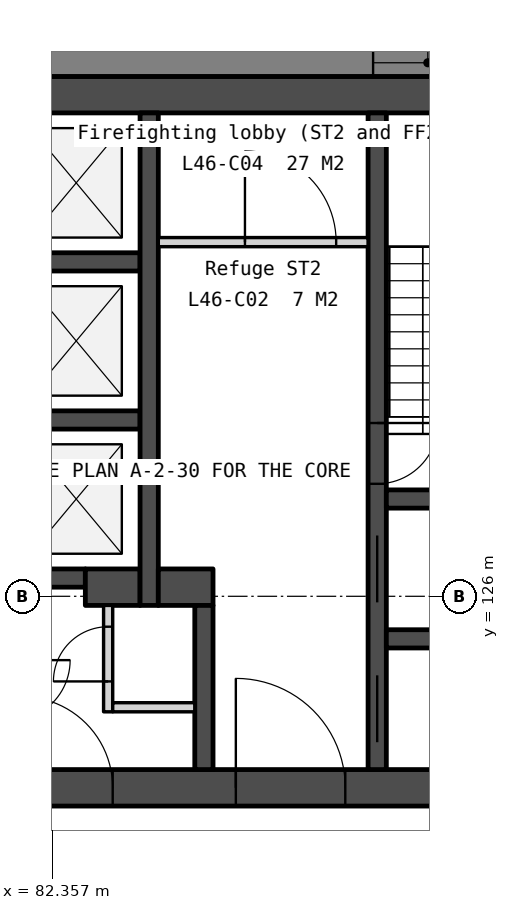
"""IFC4 building model, lengths in metres.
Left out: names, types, materials, properties, quantities, classifications, styles, units other than length and angle.
Written with IfcOpenShell. Run it as: python <this file> out.ifc"""

import sys

from ifc_helpers import new_model, si_unit, direction, frame, frame_2d, origin, place, context, subcontext, project, spatial, polyline, rectangle, outline, extrude, element, fill, save


model = new_model("IFC4")
c1 = context("Model", 3, precision=1e-05, world=origin(), true_north=direction((0.0, 1.0)))
c2 = subcontext(c1, "Body", "Model", "MODEL_VIEW")
j1 = project(units=[si_unit("LENGTHUNIT", "METRE"), si_unit("PLANEANGLEUNIT", "RADIAN")], contexts=[c1])
p1 = place(None, origin())
s1 = spatial("IfcSite", under=j1, at=p1, CompositionType="ELEMENT")
p2 = place(p1, origin())
s2 = spatial("IfcBuilding", under=s1, at=p2, CompositionType="ELEMENT")
p3 = place(p2, frame((0.0, 0.0, 184.1)))
s3 = spatial("IfcBuildingStorey", under=s2, at=p3, CompositionType="ELEMENT", Elevation=184.1)
p4 = place(p3, frame((69.0, 134.25, 0.0), z_axis=(0.0, 0.0, 1.0), x_axis=(1.0, 0.0, 0.0)))
e1 = element("IfcWall", 1, at=p4, inside=s3, PredefinedType="SOLIDWALL", context=c2, shape_type="SweptSolid", body=[
    extrude(rectangle(XDim=22.0, YDim=0.6, at=frame_2d((11.0, 0.0))), origin(), (0.0, 0.0, 1.0), 3.75),
])
p5 = place(p3, frame((69.0, 122.85, 0.0), z_axis=(0.0, 0.0, 1.0), x_axis=(1.0, 0.0, 0.0)))
e2 = element("IfcWall", 2, at=p5, inside=s3, PredefinedType="SOLIDWALL", context=c2, shape_type="SweptSolid", body=[
    extrude(rectangle(XDim=22.0, YDim=0.6, at=frame_2d((11.0, 0.0))), origin(), (0.0, 0.0, 1.0), 3.75),
])
p6 = place(p5, frame((16.375, 0.0, 0.0)))
e3 = element("IfcOpeningElement", 3, at=p6, cuts=e2, PredefinedType="OPENING", context=c2, shape_type="SweptSolid", body=[
    extrude(rectangle(XDim=1.8, YDim=2.1, at=frame_2d((0.9, 1.05))), frame((0.0, 0.31, 0.0), z_axis=(0.0, -1.0, 0.0), x_axis=(1.0, 0.0, 0.0)), (0.0, 0.0, 1.0), 0.62),
])
p7 = place(p5, frame((3.825, 0.0, 0.0)))
e4 = element("IfcOpeningElement", 4, at=p7, cuts=e2, PredefinedType="OPENING", context=c2, shape_type="SweptSolid", body=[
    extrude(rectangle(XDim=1.8, YDim=2.1, at=frame_2d((0.9, 1.05))), frame((0.0, 0.31, 0.0), z_axis=(0.0, -1.0, 0.0), x_axis=(1.0, 0.0, 0.0)), (0.0, 0.0, 1.0), 0.62),
])
p8 = place(p5, frame((12.85, 0.0, 0.0)))
e5 = element("IfcOpeningElement", 5, at=p8, cuts=e2, PredefinedType="OPENING", context=c2, shape_type="SweptSolid", body=[
    extrude(rectangle(XDim=1.5, YDim=2.1, at=frame_2d((0.75, 1.05))), frame((0.0, 0.31, 0.0), z_axis=(0.0, -1.0, 0.0), x_axis=(1.0, 0.0, 0.0)), (0.0, 0.0, 1.0), 0.62),
])
for number, where, z_axis, x_axis in (
    (6, (81.7, 131.5, 0.0), (0.0, 0.0, 1.0), (1.0, 0.0, 0.0)),
    (7, (81.7, 128.9, 0.0), (0.0, 0.0, 1.0), (1.0, 0.0, 0.0)),
):
    element("IfcWall", number, at=place(p3, frame(where, z_axis=z_axis, x_axis=x_axis)), inside=s3, PredefinedType="SOLIDWALL", context=c2, shape_type="SweptSolid", body=[
        extrude(rectangle(XDim=2.1, YDim=0.3, at=frame_2d((1.05, 0.0))), origin(), (0.0, 0.0, 1.0), 3.75),
    ])
p9 = place(p3, frame((81.7, 126.3, 0.0), z_axis=(0.0, 0.0, 1.0), x_axis=(1.0, 0.0, 0.0)))
e8 = element("IfcWall", 8, at=p9, inside=s3, PredefinedType="SOLIDWALL", context=c2, shape_type="SweptSolid", body=[
    extrude(rectangle(XDim=1.2, YDim=0.3, at=frame_2d((0.6, 0.0))), origin(), (0.0, 0.0, 1.0), 3.75),
])
p10 = place(p3, frame((82.9, 126.15, 0.0), z_axis=(0.0, 0.0, 1.0), x_axis=(1.0, 0.0, 0.0)))
e9 = element("IfcWall", 9, at=p10, inside=s3, PredefinedType="SOLIDWALL", context=c2, shape_type="SweptSolid", body=[
    extrude(rectangle(XDim=0.9, YDim=0.6, at=frame_2d((0.45, 0.0))), origin(), (0.0, 0.0, 1.0), 3.75),
])
p11 = place(p3, frame((83.275, 125.85, 0.0), z_axis=(0.0, 0.0, 1.0), x_axis=(0.0, -1.0, 0.0)))
e10 = element("IfcWall", 10, at=p11, inside=s3, PredefinedType="PARTITIONING", context=c2, shape_type="SweptSolid", body=[
    extrude(rectangle(XDim=1.75, YDim=0.15, at=frame_2d((0.875, 0.0))), origin(), (0.0, 0.0, 1.0), 3.75),
])
p12 = place(p11, frame((0.35, 0.0, 0.0)))
e11 = element("IfcOpeningElement", 11, at=p12, cuts=e10, PredefinedType="OPENING", context=c2, shape_type="SweptSolid", body=[
    extrude(rectangle(XDim=0.9, YDim=2.1, at=frame_2d((0.45, 1.05))), frame((0.0, 0.085, 0.0), z_axis=(0.0, -1.0, 0.0), x_axis=(1.0, 0.0, 0.0)), (0.0, 0.0, 1.0), 0.17),
])
p13 = place(p3, frame((83.35, 124.175, 0.0), z_axis=(0.0, 0.0, 1.0), x_axis=(1.0, 0.0, 0.0)))
e12 = element("IfcWall", 12, at=p13, inside=s3, PredefinedType="PARTITIONING", context=c2, shape_type="SweptSolid", body=[
    extrude(rectangle(XDim=1.35, YDim=0.15, at=frame_2d((0.675, 0.0))), origin(), (0.0, 0.0, 1.0), 3.75),
])
p14 = place(p3, frame((83.95, 133.95, 0.0), z_axis=(0.0, 0.0, 1.0), x_axis=(0.0, -1.0, 0.0)))
e13 = element("IfcWall", 13, at=p14, inside=s3, PredefinedType="SOLIDWALL", context=c2, shape_type="SweptSolid", body=[
    extrude(rectangle(XDim=8.1, YDim=0.3, at=frame_2d((4.05, 0.0))), origin(), (0.0, 0.0, 1.0), 3.75),
])
p15 = place(p3, frame((84.1, 131.825, 0.0), z_axis=(0.0, 0.0, 1.0), x_axis=(1.0, 0.0, 0.0)))
e14 = element("IfcWall", 14, at=p15, inside=s3, PredefinedType="PARTITIONING", context=c2, shape_type="SweptSolid", body=[
    extrude(rectangle(XDim=3.45, YDim=0.15, at=frame_2d((1.725, 0.0))), origin(), (0.0, 0.0, 1.0), 3.75),
])
p16 = place(p15, frame((1.425, 0.0, 0.0)))
e15 = element("IfcOpeningElement", 15, at=p16, cuts=e14, PredefinedType="OPENING", context=c2, shape_type="SweptSolid", body=[
    extrude(rectangle(XDim=1.5, YDim=2.1, at=frame_2d((0.75, 1.05))), frame((0.0, 0.085, 0.0), z_axis=(0.0, -1.0, 0.0), x_axis=(1.0, 0.0, 0.0)), (0.0, 0.0, 1.0), 0.17),
])
p17 = place(p3, frame((84.1, 126.15, 0.0), z_axis=(0.0, 0.0, 1.0), x_axis=(1.0, 0.0, 0.0)))
e16 = element("IfcWall", 16, at=p17, inside=s3, PredefinedType="SOLIDWALL", context=c2, shape_type="SweptSolid", body=[
    extrude(rectangle(XDim=0.9, YDim=0.6, at=frame_2d((0.45, 0.0))), origin(), (0.0, 0.0, 1.0), 3.75),
])
p18 = place(p3, frame((84.85, 125.85, 0.0), z_axis=(0.0, 0.0, 1.0), x_axis=(0.0, -1.0, 0.0)))
e17 = element("IfcWall", 17, at=p18, inside=s3, PredefinedType="SOLIDWALL", context=c2, shape_type="SweptSolid", body=[
    extrude(rectangle(XDim=2.7, YDim=0.3, at=frame_2d((1.35, 0.0))), origin(), (0.0, 0.0, 1.0), 3.75),
])
p19 = place(p3, frame((87.7, 133.95, 0.0), z_axis=(0.0, 0.0, 1.0), x_axis=(0.0, -1.0, 0.0)))
e18 = element("IfcWall", 18, at=p19, inside=s3, PredefinedType="SOLIDWALL", context=c2, shape_type="SweptSolid", body=[
    extrude(rectangle(XDim=10.8, YDim=0.3, at=frame_2d((5.4, 0.0))), origin(), (0.0, 0.0, 1.0), 3.75),
])
p20 = place(p19, frame((6.95, 0.0, 0.0)))
e19 = element("IfcOpeningElement", 19, at=p20, cuts=e18, PredefinedType="OPENING", context=c2, shape_type="SweptSolid", body=[
    extrude(rectangle(XDim=1.1, YDim=2.1, at=frame_2d((0.55, 1.05))), frame((0.0, 0.16, 0.0), z_axis=(0.0, -1.0, 0.0), x_axis=(1.0, 0.0, 0.0)), (0.0, 0.0, 1.0), 0.32),
])
p21 = place(p19, frame((5.1, 0.0, 0.0)))
e20 = element("IfcOpeningElement", 20, at=p21, cuts=e18, PredefinedType="OPENING", context=c2, shape_type="SweptSolid", body=[
    extrude(rectangle(XDim=1.0, YDim=2.1, at=frame_2d((0.5, 1.05))), frame((0.0, 0.16, 0.0), z_axis=(0.0, -1.0, 0.0), x_axis=(1.0, 0.0, 0.0)), (0.0, 0.0, 1.0), 0.32),
])
p22 = place(p19, frame((9.25, 0.0, 0.0)))
e21 = element("IfcOpeningElement", 21, at=p22, cuts=e18, PredefinedType="OPENING", context=c2, shape_type="SweptSolid", body=[
    extrude(rectangle(XDim=1.1, YDim=2.1, at=frame_2d((0.55, 1.05))), frame((0.0, 0.16, 0.0), z_axis=(0.0, -1.0, 0.0), x_axis=(1.0, 0.0, 0.0)), (0.0, 0.0, 1.0), 0.32),
])
for number, where, z_axis, x_axis in (
    (22, (87.85, 127.6, 0.0), (0.0, 0.0, 1.0), (1.0, 0.0, 0.0)),
    (23, (87.85, 125.3, 0.0), (0.0, 0.0, 1.0), (1.0, 0.0, 0.0)),
):
    element("IfcWall", number, at=place(p3, frame(where, z_axis=z_axis, x_axis=x_axis)), inside=s3, PredefinedType="SOLIDWALL", context=c2, shape_type="SweptSolid", body=[
        extrude(rectangle(XDim=2.55, YDim=0.3, at=frame_2d((1.275, 0.0))), origin(), (0.0, 0.0, 1.0), 3.75),
    ])
p23 = place(p3, frame((99.365, 134.775, -0.15), z_axis=(0.0, 0.0, 1.0), x_axis=(-1.0, 0.0, 0.0)))
e24 = element("IfcWall", 24, at=p23, inside=s3, PredefinedType="SOLIDWALL", context=c2, shape_type="SweptSolid", body=[
    extrude(outline(polyline([(38.729, 0.0), (38.729, 3.9), (0.0, 3.9), (0.0, 0.0), (38.729, 0.0)])), frame((0.0, 0.225, 0.0), z_axis=(0.0, -1.0, 0.0), x_axis=(1.0, 0.0, 0.0)), (0.0, 0.0, 1.0), 0.45),
])
p24 = place(p23, frame((0.776, 0.0, 0.95)))
e25 = element("IfcOpeningElement", 25, at=p24, cuts=e24, PredefinedType="OPENING", context=c2, shape_type="SweptSolid", body=[
    extrude(rectangle(XDim=1.2, YDim=2.2, at=frame_2d((0.6, 1.1))), frame((0.0, 0.235, 0.0), z_axis=(0.0, -1.0, 0.0), x_axis=(1.0, 0.0, 0.0)), (0.0, 0.0, 1.0), 0.47),
])
p25 = place(p23, frame((7.632, 0.0, 0.95)))
e26 = element("IfcOpeningElement", 26, at=p25, cuts=e24, PredefinedType="OPENING", context=c2, shape_type="SweptSolid", body=[
    extrude(rectangle(XDim=1.8, YDim=2.2, at=frame_2d((0.9, 1.1))), frame((0.0, 0.235, 0.0), z_axis=(0.0, -1.0, 0.0), x_axis=(1.0, 0.0, 0.0)), (0.0, 0.0, 1.0), 0.47),
])
p26 = place(p23, frame((9.932, 0.0, 0.95)))
e27 = element("IfcOpeningElement", 27, at=p26, cuts=e24, PredefinedType="OPENING", context=c2, shape_type="SweptSolid", body=[
    extrude(rectangle(XDim=1.8, YDim=2.2, at=frame_2d((0.9, 1.1))), frame((0.0, 0.235, 0.0), z_axis=(0.0, -1.0, 0.0), x_axis=(1.0, 0.0, 0.0)), (0.0, 0.0, 1.0), 0.47),
])
p27 = place(p23, frame((17.315, 0.0, 0.95)))
e28 = element("IfcOpeningElement", 28, at=p27, cuts=e24, PredefinedType="OPENING", context=c2, shape_type="SweptSolid", body=[
    extrude(rectangle(XDim=1.8, YDim=2.2, at=frame_2d((0.9, 1.1))), frame((0.0, 0.235, 0.0), z_axis=(0.0, -1.0, 0.0), x_axis=(1.0, 0.0, 0.0)), (0.0, 0.0, 1.0), 0.47),
])
p28 = place(p23, frame((19.615, 0.0, 0.95)))
e29 = element("IfcOpeningElement", 29, at=p28, cuts=e24, PredefinedType="OPENING", context=c2, shape_type="SweptSolid", body=[
    extrude(rectangle(XDim=1.8, YDim=2.2, at=frame_2d((0.9, 1.1))), frame((0.0, 0.235, 0.0), z_axis=(0.0, -1.0, 0.0), x_axis=(1.0, 0.0, 0.0)), (0.0, 0.0, 1.0), 0.47),
])
p29 = place(p23, frame((26.997, 0.0, 0.95)))
e30 = element("IfcOpeningElement", 30, at=p29, cuts=e24, PredefinedType="OPENING", context=c2, shape_type="SweptSolid", body=[
    extrude(rectangle(XDim=1.8, YDim=2.2, at=frame_2d((0.9, 1.1))), frame((0.0, 0.235, 0.0), z_axis=(0.0, -1.0, 0.0), x_axis=(1.0, 0.0, 0.0)), (0.0, 0.0, 1.0), 0.47),
])
p30 = place(p23, frame((29.297, 0.0, 0.95)))
e31 = element("IfcOpeningElement", 31, at=p30, cuts=e24, PredefinedType="OPENING", context=c2, shape_type="SweptSolid", body=[
    extrude(rectangle(XDim=1.8, YDim=2.2, at=frame_2d((0.9, 1.1))), frame((0.0, 0.235, 0.0), z_axis=(0.0, -1.0, 0.0), x_axis=(1.0, 0.0, 0.0)), (0.0, 0.0, 1.0), 0.47),
])
p31 = place(p23, frame((36.753, 0.0, 0.95)))
e32 = element("IfcOpeningElement", 32, at=p31, cuts=e24, PredefinedType="OPENING", context=c2, shape_type="SweptSolid", body=[
    extrude(rectangle(XDim=1.2, YDim=2.2, at=frame_2d((0.6, 1.1))), frame((0.0, 0.235, 0.0), z_axis=(0.0, -1.0, 0.0), x_axis=(1.0, 0.0, 0.0)), (0.0, 0.0, 1.0), 0.47),
])
p32 = place(p3, frame((81.505, 98.627, -0.15), z_axis=(0.0, 0.0, 1.0), x_axis=(0.500002199942, 0.866024133644, 0.0)))
e33 = element("IfcWall", 33, at=p32, inside=s3, PredefinedType="SOLIDWALL", context=c2, shape_type="SweptSolid", body=[
    extrude(outline(polyline([(38.729, 0.0), (38.729, 3.9), (0.0, 3.9), (0.0, 0.0), (38.729, 0.0)])), frame((0.0, 0.225, 0.0), z_axis=(0.0, -1.0, 0.0), x_axis=(1.0, 0.0, 0.0)), (0.0, 0.0, 1.0), 0.45),
])
p33 = place(p32, frame((0.776, 0.0, 0.95)))
e34 = element("IfcOpeningElement", 34, at=p33, cuts=e33, PredefinedType="OPENING", context=c2, shape_type="SweptSolid", body=[
    extrude(rectangle(XDim=1.2, YDim=2.2, at=frame_2d((0.6, 1.1))), frame((0.0, 0.235, 0.0), z_axis=(0.0, -1.0, 0.0), x_axis=(1.0, 0.0, 0.0)), (0.0, 0.0, 1.0), 0.47),
])
p34 = place(p32, frame((7.632, 0.0, 0.95)))
e35 = element("IfcOpeningElement", 35, at=p34, cuts=e33, PredefinedType="OPENING", context=c2, shape_type="SweptSolid", body=[
    extrude(rectangle(XDim=1.8, YDim=2.2, at=frame_2d((0.9, 1.1))), frame((0.0, 0.235, 0.0), z_axis=(0.0, -1.0, 0.0), x_axis=(1.0, 0.0, 0.0)), (0.0, 0.0, 1.0), 0.47),
])
p35 = place(p32, frame((9.932, 0.0, 0.95)))
e36 = element("IfcOpeningElement", 36, at=p35, cuts=e33, PredefinedType="OPENING", context=c2, shape_type="SweptSolid", body=[
    extrude(rectangle(XDim=1.8, YDim=2.2, at=frame_2d((0.9, 1.1))), frame((0.0, 0.235, 0.0), z_axis=(0.0, -1.0, 0.0), x_axis=(1.0, 0.0, 0.0)), (0.0, 0.0, 1.0), 0.47),
])
p36 = place(p32, frame((17.315, 0.0, 0.95)))
e37 = element("IfcOpeningElement", 37, at=p36, cuts=e33, PredefinedType="OPENING", context=c2, shape_type="SweptSolid", body=[
    extrude(rectangle(XDim=1.8, YDim=2.2, at=frame_2d((0.9, 1.1))), frame((0.0, 0.235, 0.0), z_axis=(0.0, -1.0, 0.0), x_axis=(1.0, 0.0, 0.0)), (0.0, 0.0, 1.0), 0.47),
])
p37 = place(p32, frame((19.615, 0.0, 0.95)))
e38 = element("IfcOpeningElement", 38, at=p37, cuts=e33, PredefinedType="OPENING", context=c2, shape_type="SweptSolid", body=[
    extrude(rectangle(XDim=1.8, YDim=2.2, at=frame_2d((0.9, 1.1))), frame((0.0, 0.235, 0.0), z_axis=(0.0, -1.0, 0.0), x_axis=(1.0, 0.0, 0.0)), (0.0, 0.0, 1.0), 0.47),
])
p38 = place(p32, frame((26.997, 0.0, 0.95)))
e39 = element("IfcOpeningElement", 39, at=p38, cuts=e33, PredefinedType="OPENING", context=c2, shape_type="SweptSolid", body=[
    extrude(rectangle(XDim=1.8, YDim=2.2, at=frame_2d((0.9, 1.1))), frame((0.0, 0.235, 0.0), z_axis=(0.0, -1.0, 0.0), x_axis=(1.0, 0.0, 0.0)), (0.0, 0.0, 1.0), 0.47),
])
p39 = place(p32, frame((29.297, 0.0, 0.95)))
e40 = element("IfcOpeningElement", 40, at=p39, cuts=e33, PredefinedType="OPENING", context=c2, shape_type="SweptSolid", body=[
    extrude(rectangle(XDim=1.8, YDim=2.2, at=frame_2d((0.9, 1.1))), frame((0.0, 0.235, 0.0), z_axis=(0.0, -1.0, 0.0), x_axis=(1.0, 0.0, 0.0)), (0.0, 0.0, 1.0), 0.47),
])
p40 = place(p32, frame((36.753, 0.0, 0.95)))
e41 = element("IfcOpeningElement", 41, at=p40, cuts=e33, PredefinedType="OPENING", context=c2, shape_type="SweptSolid", body=[
    extrude(rectangle(XDim=1.2, YDim=2.2, at=frame_2d((0.6, 1.1))), frame((0.0, 0.235, 0.0), z_axis=(0.0, -1.0, 0.0), x_axis=(1.0, 0.0, 0.0)), (0.0, 0.0, 1.0), 0.47),
])
p41 = place(p20, origin())
e42 = element("IfcDoor", 42, at=p41, inside=s3, OperationType="SLIDING_TO_LEFT", PredefinedType="DOOR", context=c2, shape_type="SweptSolid", body=[
    extrude(rectangle(XDim=1.1, YDim=2.1, at=frame_2d((0.55, 1.05))), frame((0.0, 0.025, 0.0), z_axis=(0.0, -1.0, 0.0), x_axis=(1.0, 0.0, 0.0)), (0.0, 0.0, 1.0), 0.05),
])
fill(e19, e42)
p42 = place(p6, origin())
e43 = element("IfcDoor", 43, at=p42, inside=s3, OperationType="DOUBLE_DOOR_DOUBLE_SWING", PredefinedType="DOOR", context=c2, shape_type="SweptSolid", body=[
    extrude(rectangle(XDim=1.8, YDim=2.1, at=frame_2d((0.9, 1.05))), frame((0.0, 0.025, 0.0), z_axis=(0.0, -1.0, 0.0), x_axis=(1.0, 0.0, 0.0)), (0.0, 0.0, 1.0), 0.05),
])
fill(e3, e43)
p43 = place(p8, origin())
e44 = element("IfcDoor", 44, at=p43, inside=s3, OperationType="DOUBLE_DOOR_DOUBLE_SWING", PredefinedType="DOOR", context=c2, shape_type="SweptSolid", body=[
    extrude(rectangle(XDim=1.5, YDim=2.1, at=frame_2d((0.75, 1.05))), frame((0.0, 0.025, 0.0), z_axis=(0.0, -1.0, 0.0), x_axis=(1.0, 0.0, 0.0)), (0.0, 0.0, 1.0), 0.05),
])
fill(e5, e44)
p44 = place(p12, origin())
e45 = element("IfcDoor", 45, at=p44, inside=s3, OperationType="SINGLE_SWING_RIGHT", PredefinedType="DOOR", context=c2, shape_type="SweptSolid", body=[
    extrude(rectangle(XDim=0.9, YDim=2.1, at=frame_2d((0.45, 1.05))), frame((0.0, 0.025, 0.0), z_axis=(0.0, -1.0, 0.0), x_axis=(1.0, 0.0, 0.0)), (0.0, 0.0, 1.0), 0.05),
])
fill(e11, e45)
p45 = place(p16, origin())
e46 = element("IfcDoor", 46, at=p45, inside=s3, OperationType="DOUBLE_DOOR_DOUBLE_SWING", PredefinedType="DOOR", context=c2, shape_type="SweptSolid", body=[
    extrude(rectangle(XDim=1.5, YDim=2.1, at=frame_2d((0.75, 1.05))), frame((0.0, 0.025, 0.0), z_axis=(0.0, -1.0, 0.0), x_axis=(1.0, 0.0, 0.0)), (0.0, 0.0, 1.0), 0.05),
])
fill(e15, e46)
p46 = place(p21, origin())
e47 = element("IfcDoor", 47, at=p46, inside=s3, OperationType="SINGLE_SWING_LEFT", PredefinedType="DOOR", context=c2, shape_type="SweptSolid", body=[
    extrude(rectangle(XDim=1.0, YDim=2.1, at=frame_2d((0.5, 1.05))), frame((0.0, 0.025, 0.0), z_axis=(0.0, -1.0, 0.0), x_axis=(1.0, 0.0, 0.0)), (0.0, 0.0, 1.0), 0.05),
])
fill(e20, e47)
p47 = place(p22, origin())
e48 = element("IfcDoor", 48, at=p47, inside=s3, OperationType="SLIDING_TO_LEFT", PredefinedType="DOOR", context=c2, shape_type="SweptSolid", body=[
    extrude(rectangle(XDim=1.1, YDim=2.1, at=frame_2d((0.55, 1.05))), frame((0.0, 0.025, 0.0), z_axis=(0.0, -1.0, 0.0), x_axis=(1.0, 0.0, 0.0)), (0.0, 0.0, 1.0), 0.05),
])
fill(e21, e48)
p48 = place(p26, origin())
e49 = element("IfcWindow", 49, at=p48, inside=s3, PartitioningType="SINGLE_PANEL", PredefinedType="WINDOW", context=c2, shape_type="SweptSolid", body=[
    extrude(rectangle(XDim=1.8, YDim=2.2, at=frame_2d((0.9, 1.1))), frame((0.0, 0.03, 0.0), z_axis=(0.0, -1.0, 0.0), x_axis=(1.0, 0.0, 0.0)), (0.0, 0.0, 1.0), 0.06),
])
fill(e27, e49)
save(model, sys.argv[1])
